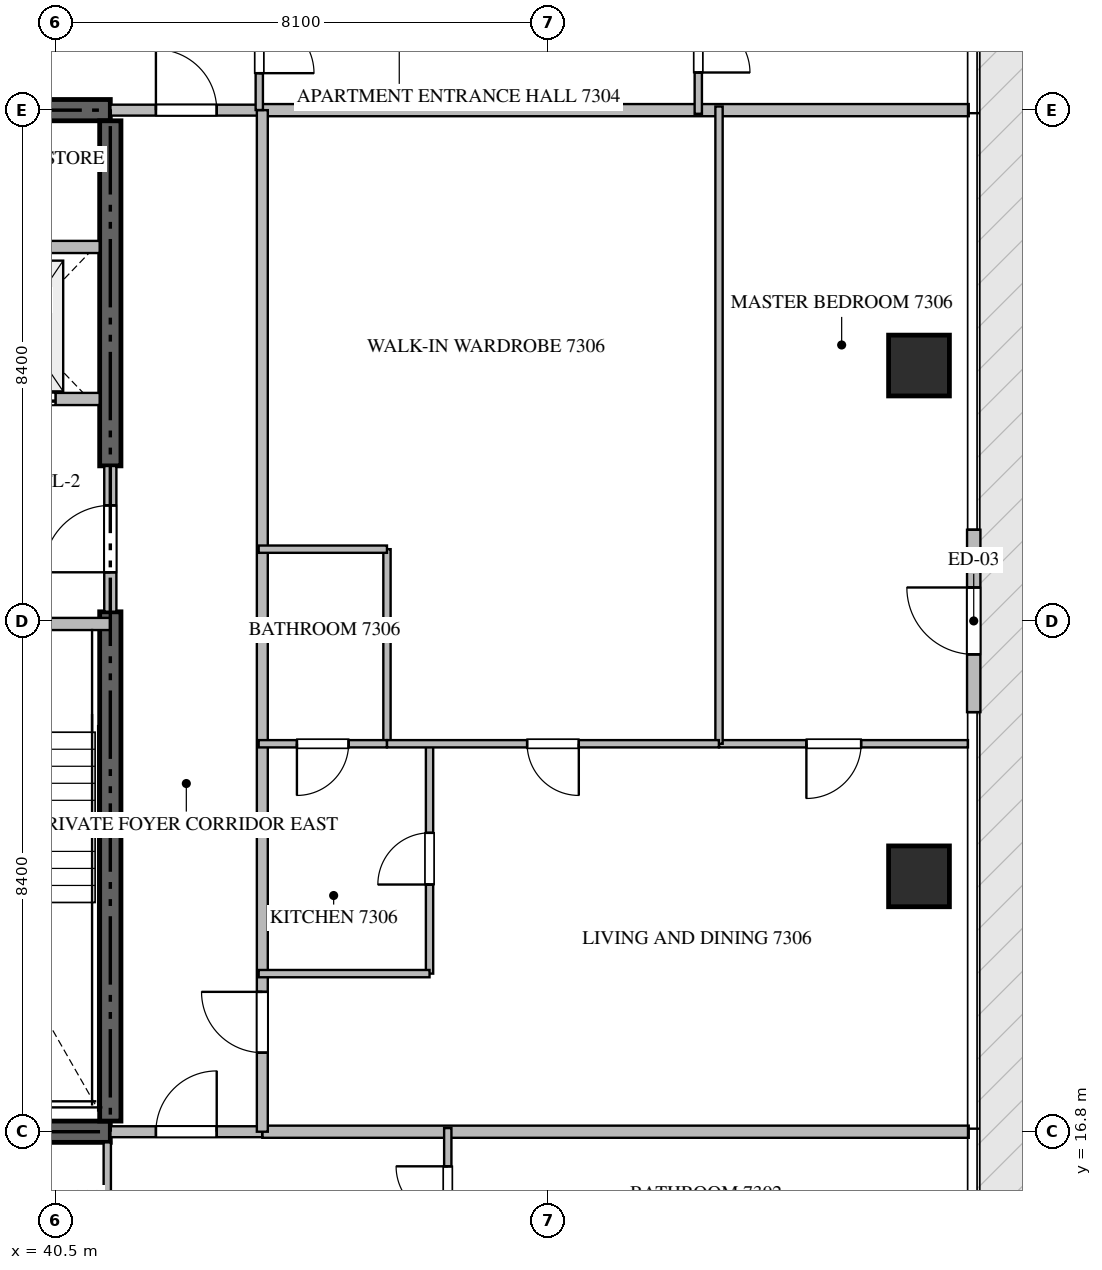
"""IFC4 building model, lengths in metres.
Left out: names, types, materials, properties, quantities, classifications, styles, units other than length and angle.
Written with IfcOpenShell. Run it as: python <this file> out.ifc"""

import sys

from ifc_helpers import new_model, si_unit, direction, frame, frame_2d, origin, origin_2d, place, context, subcontext, project, spatial, rectangle, extrude, source, transform, mapped, element, fill, save


model = new_model("IFC4")
c1 = context("Model", 3, precision=1e-05, world=origin(), true_north=direction((0.0, 1.0)))
c2 = subcontext(c1, "Body", "Model", "MODEL_VIEW")
j1 = project(units=[si_unit("LENGTHUNIT", "METRE"), si_unit("PLANEANGLEUNIT", "RADIAN")], contexts=[c1])
p1 = place(None, origin())
s1 = spatial("IfcSite", under=j1, at=p1, CompositionType="ELEMENT")
p2 = place(p1, origin())
s2 = spatial("IfcBuilding", under=s1, at=p2, CompositionType="ELEMENT")
p3 = place(p2, frame((0.0, 0.0, 293.45)))
s3 = spatial("IfcBuildingStorey", under=s2, at=p3, CompositionType="ELEMENT", Elevation=293.45)
for number, where, z_axis, x_axis in (
    (1, (23.4, 16.8, -0.26), (0.0, 0.0, 1.0), (1.0, 0.0, 0.0)),
    (2, (41.4, 33.6, -0.26), (0.0, 0.0, 1.0), (-1.0, 0.0, 0.0)),
):
    element("IfcWall", number, at=place(p3, frame(where, z_axis=z_axis, x_axis=x_axis)), inside=s3, PredefinedType="SHEAR", context=c2, shape_type="SweptSolid", body=[
        extrude(rectangle(XDim=18.0, YDim=0.35, at=frame_2d((9.0, 0.0))), origin(), (0.0, 0.0, 1.0), 4.048),
    ])
p4 = place(p3, frame((41.4, 16.975, -0.26), z_axis=(0.0, 0.0, 1.0), x_axis=(0.0, 1.0, 0.0)))
e3 = element("IfcWall", 3, at=p4, inside=s3, PredefinedType="SHEAR", context=c2, shape_type="SweptSolid", body=[
    extrude(rectangle(XDim=8.375, YDim=0.35, at=frame_2d((4.188, 0.0))), origin(), (0.0, 0.0, 1.0), 4.048),
])
p5 = place(p3, frame((41.4, 27.75, -0.26), z_axis=(0.0, 0.0, 1.0), x_axis=(0.0, 1.0, 0.0)))
e4 = element("IfcWall", 4, at=p5, inside=s3, PredefinedType="SHEAR", context=c2, shape_type="SweptSolid", body=[
    extrude(rectangle(XDim=5.675, YDim=0.35, at=frame_2d((2.837, 0.0))), origin(), (0.0, 0.0, 1.0), 4.048),
])
m1 = source(origin(), c2, "Body", "SweptSolid", [
    extrude(rectangle(XDim=1.0, YDim=1.0, at=origin_2d()), origin(), (0.0, 0.0, 1.0), 4.05),
])
for number, where, z_axis, x_axis in (
    (5, (54.7, 21.0, -0.26), (0.0, 0.0, 1.0), (1.0, 0.0, 0.0)),
    (6, (54.7, 29.4, -0.26), (0.0, 0.0, 1.0), (1.0, 0.0, 0.0)),
):
    element("IfcColumn", number, at=place(p3, frame(where, z_axis=z_axis, x_axis=x_axis)), inside=s3, PredefinedType="COLUMN", context=c2, shape_type="MappedRepresentation", body=[
        mapped(m1, transform((0.0, 0.0, 0.0), scale=1.0)),
    ])
p6 = place(p3, frame((55.6, 23.7, 0.0), z_axis=(0.0, 0.0, 1.0), x_axis=(0.0, 1.0, 0.0)))
e7 = element("IfcWall", 7, at=p6, inside=s3, PredefinedType="ELEMENTEDWALL", context=c2, shape_type="SweptSolid", body=[
    extrude(rectangle(XDim=3.0, YDim=0.22, at=frame_2d((1.5, 0.0))), origin(), (0.0, 0.0, 1.0), 3.775),
])
p7 = place(p6, frame((0.95, 0.0, 0.0)))
e8 = element("IfcOpeningElement", 8, at=p7, cuts=e7, PredefinedType="OPENING", context=c2, shape_type="SweptSolid", body=[
    extrude(rectangle(XDim=1.1, YDim=2.2, at=frame_2d((0.55, 1.1))), frame((0.0, 0.12, 0.0), z_axis=(0.0, -1.0, 0.0), x_axis=(1.0, 0.0, 0.0)), (0.0, 0.0, 1.0), 0.24),
])
p8 = place(p3, frame((36.95, 25.15, 0.0), z_axis=(0.0, 0.0, 1.0), x_axis=(1.0, 0.0, 0.0)))
e9 = element("IfcWall", 9, at=p8, inside=s3, PredefinedType="STANDARD", context=c2, shape_type="SweptSolid", body=[
    extrude(rectangle(XDim=4.45, YDim=0.2, at=frame_2d((2.225, 0.0))), origin(), (0.0, 0.0, 1.0), 3.79),
])
p9 = place(p8, frame((1.65, 0.0, 0.0)))
e10 = element("IfcOpeningElement", 10, at=p9, cuts=e9, PredefinedType="OPENING", context=c2, shape_type="SweptSolid", body=[
    extrude(rectangle(XDim=1.1, YDim=2.15, at=frame_2d((0.55, 1.075))), frame((0.0, 0.11, 0.0), z_axis=(0.0, -1.0, 0.0), x_axis=(1.0, 0.0, 0.0)), (0.0, 0.0, 1.0), 0.22),
])
p10 = place(p3, frame((38.75, 28.85, 0.0), z_axis=(0.0, 0.0, 1.0), x_axis=(1.0, 0.0, 0.0)))
e11 = element("IfcWall", 11, at=p10, inside=s3, PredefinedType="STANDARD", context=c2, shape_type="SweptSolid", body=[
    extrude(rectangle(XDim=2.475, YDim=0.2, at=frame_2d((1.238, 0.0))), origin(), (0.0, 0.0, 1.0), 3.79),
])
p11 = place(p10, frame((0.55, 0.0, 0.0)))
e12 = element("IfcOpeningElement", 12, at=p11, cuts=e11, PredefinedType="OPENING", context=c2, shape_type="SweptSolid", body=[
    extrude(rectangle(XDim=1.2, YDim=2.2, at=frame_2d((0.6, 1.1))), frame((0.0, 0.11, 0.0), z_axis=(0.0, -1.0, 0.0), x_axis=(1.0, 0.0, 0.0)), (0.0, 0.0, 1.0), 0.22),
])
p12 = place(p3, frame((38.75, 31.35, 0.0), z_axis=(0.0, 0.0, 1.0), x_axis=(1.0, 0.0, 0.0)))
e13 = element("IfcWall", 13, at=p12, inside=s3, PredefinedType="STANDARD", context=c2, shape_type="SweptSolid", body=[
    extrude(rectangle(XDim=2.475, YDim=0.2, at=frame_2d((1.238, 0.0))), origin(), (0.0, 0.0, 1.0), 3.79),
])
p13 = place(p3, frame((41.4, 25.352, 0.0), z_axis=(0.0, 0.0, 1.0), x_axis=(0.0, 1.0, 0.0)))
e14 = element("IfcWall", 14, at=p13, inside=s3, PredefinedType="STANDARD", context=c2, shape_type="SweptSolid", body=[
    extrude(rectangle(XDim=2.396, YDim=0.2, at=frame_2d((1.198, 0.0))), origin(), (0.0, 0.0, 1.0), 3.79),
])
p14 = place(p13, frame((0.648, 0.0, 0.0)))
e15 = element("IfcOpeningElement", 15, at=p14, cuts=e14, PredefinedType="OPENING", context=c2, shape_type="SweptSolid", body=[
    extrude(rectangle(XDim=1.1, YDim=2.15, at=frame_2d((0.55, 1.075))), frame((0.0, 0.11, 0.0), z_axis=(0.0, -1.0, 0.0), x_axis=(1.0, 0.0, 0.0)), (0.0, 0.0, 1.0), 0.22),
])
for number, where, z_axis, x_axis in (
    (16, (43.9, 16.8, 0.0), (0.0, 0.0, 1.0), (1.0, 0.0, 0.0)),
    (17, (43.9, 33.6, 0.0), (0.0, 0.0, 1.0), (1.0, 0.0, 0.0)),
):
    element("IfcWall", number, at=place(p3, frame(where, z_axis=z_axis, x_axis=x_axis)), inside=s3, PredefinedType="PARTITIONING", context=c2, shape_type="SweptSolid", body=[
        extrude(rectangle(XDim=11.618, YDim=0.2, at=frame_2d((5.809, 0.0))), origin(), (0.0, 0.0, 1.0), 3.79),
    ])
p15 = place(p3, frame((41.402, 16.8, 0.0), z_axis=(0.0, 0.0, 1.0), x_axis=(1.0, 0.0, 0.0)))
e18 = element("IfcWall", 18, at=p15, inside=s3, PredefinedType="PARTITIONING", context=c2, shape_type="SweptSolid", body=[
    extrude(rectangle(XDim=2.496, YDim=0.18, at=frame_2d((1.248, 0.0))), origin(), (0.0, 0.0, 1.0), 3.79),
])
p16 = place(p15, frame((0.748, 0.0, 0.0)))
e19 = element("IfcOpeningElement", 19, at=p16, cuts=e18, PredefinedType="OPENING", context=c2, shape_type="SweptSolid", body=[
    extrude(rectangle(XDim=1.0, YDim=2.15, at=frame_2d((0.5, 1.075))), frame((0.0, 0.1, 0.0), z_axis=(0.0, -1.0, 0.0), x_axis=(1.0, 0.0, 0.0)), (0.0, 0.0, 1.0), 0.2),
])
p17 = place(p3, frame((41.402, 33.6, 0.0), z_axis=(0.0, 0.0, 1.0), x_axis=(1.0, 0.0, 0.0)))
e20 = element("IfcWall", 20, at=p17, inside=s3, PredefinedType="PARTITIONING", context=c2, shape_type="SweptSolid", body=[
    extrude(rectangle(XDim=2.496, YDim=0.18, at=frame_2d((1.248, 0.0))), origin(), (0.0, 0.0, 1.0), 3.79),
])
p18 = place(p17, frame((0.748, 0.0, 0.0)))
e21 = element("IfcOpeningElement", 21, at=p18, cuts=e20, PredefinedType="OPENING", context=c2, shape_type="SweptSolid", body=[
    extrude(rectangle(XDim=1.0, YDim=2.15, at=frame_2d((0.5, 1.075))), frame((0.0, 0.1, 0.0), z_axis=(0.0, -1.0, 0.0), x_axis=(1.0, 0.0, 0.0)), (0.0, 0.0, 1.0), 0.2),
])
p19 = place(p3, frame((43.9, 16.8, 0.0), z_axis=(0.0, 0.0, 1.0), x_axis=(0.0, 1.0, 0.0)))
e22 = element("IfcWall", 22, at=p19, inside=s3, PredefinedType="PARTITIONING", context=c2, shape_type="SweptSolid", body=[
    extrude(rectangle(XDim=16.8, YDim=0.18, at=frame_2d((8.4, 0.0))), origin(), (0.0, 0.0, 1.0), 3.79),
])
p20 = place(p19, frame((1.3, 0.0, 0.0)))
e23 = element("IfcOpeningElement", 23, at=p20, cuts=e22, PredefinedType="OPENING", context=c2, shape_type="SweptSolid", body=[
    extrude(rectangle(XDim=1.0, YDim=2.15, at=frame_2d((0.5, 1.075))), frame((0.0, 0.1, 0.0), z_axis=(0.0, -1.0, 0.0), x_axis=(1.0, 0.0, 0.0)), (0.0, 0.0, 1.0), 0.2),
])
p21 = place(p3, frame((41.35, 14.05, 0.0), z_axis=(0.0, 0.0, 1.0), x_axis=(0.0, 1.0, 0.0)))
e24 = element("IfcWall", 24, at=p21, inside=s3, PredefinedType="PARTITIONING", context=c2, shape_type="SweptSolid", body=[
    extrude(rectangle(XDim=2.575, YDim=0.12, at=frame_2d((1.288, 0.0))), origin(), (0.0, 0.0, 1.0), 3.79),
])
p22 = place(p3, frame((46.95, 14.752, 0.0), z_axis=(0.0, 0.0, 1.0), x_axis=(0.0, 1.0, 0.0)))
e25 = element("IfcWall", 25, at=p22, inside=s3, PredefinedType="PARTITIONING", context=c2, shape_type="SweptSolid", body=[
    extrude(rectangle(XDim=2.108, YDim=0.12, at=frame_2d((1.054, 0.0))), origin(), (0.0, 0.0, 1.0), 3.372),
])
p23 = place(p22, frame((0.629, 0.0, 0.0)))
e26 = element("IfcOpeningElement", 26, at=p23, cuts=e25, PredefinedType="OPENING", context=c2, shape_type="SweptSolid", body=[
    extrude(rectangle(XDim=0.85, YDim=2.1, at=frame_2d((0.425, 1.05))), frame((0.0, 0.07, 0.0), z_axis=(0.0, -1.0, 0.0), x_axis=(1.0, 0.0, 0.0)), (0.0, 0.0, 1.0), 0.14),
])
p24 = place(p3, frame((43.85, 35.75, 0.0), z_axis=(0.0, 0.0, 1.0), x_axis=(0.0, -1.0, 0.0)))
e27 = element("IfcWall", 27, at=p24, inside=s3, PredefinedType="PARTITIONING", context=c2, shape_type="SweptSolid", body=[
    extrude(rectangle(XDim=2.148, YDim=0.12, at=frame_2d((1.074, 0.0))), origin(), (0.0, 0.0, 1.0), 3.79),
])
p25 = place(p24, frame((0.642, 0.0, 0.0)))
e28 = element("IfcOpeningElement", 28, at=p25, cuts=e27, PredefinedType="OPENING", context=c2, shape_type="SweptSolid", body=[
    extrude(rectangle(XDim=0.9, YDim=2.1, at=frame_2d((0.45, 1.05))), frame((0.0, 0.07, 0.0), z_axis=(0.0, -1.0, 0.0), x_axis=(1.0, 0.0, 0.0)), (0.0, 0.0, 1.0), 0.14),
])
p26 = place(p3, frame((51.07, 35.748, 0.0), z_axis=(0.0, 0.0, 1.0), x_axis=(0.0, -1.0, 0.0)))
e29 = element("IfcWall", 29, at=p26, inside=s3, PredefinedType="PARTITIONING", context=c2, shape_type="SweptSolid", body=[
    extrude(rectangle(XDim=2.208, YDim=0.12, at=frame_2d((1.104, 0.0))), origin(), (0.0, 0.0, 1.0), 3.79),
])
p27 = place(p26, frame((0.679, 0.0, 0.0)))
e30 = element("IfcOpeningElement", 30, at=p27, cuts=e29, PredefinedType="OPENING", context=c2, shape_type="SweptSolid", body=[
    extrude(rectangle(XDim=0.85, YDim=2.1, at=frame_2d((0.425, 1.05))), frame((0.0, 0.07, 0.0), z_axis=(0.0, -1.0, 0.0), x_axis=(1.0, 0.0, 0.0)), (0.0, 0.0, 1.0), 0.14),
])
p28 = place(p3, frame((46.65, 19.4, 0.0), z_axis=(0.0, 0.0, 1.0), x_axis=(0.0, 1.0, 0.0)))
e31 = element("IfcWall", 31, at=p28, inside=s3, PredefinedType="PARTITIONING", context=c2, shape_type="SweptSolid", body=[
    extrude(rectangle(XDim=3.78, YDim=0.12, at=frame_2d((1.89, 0.0))), origin(), (0.0, 0.0, 1.0), 3.79),
])
p29 = place(p28, frame((1.465, 0.0, 0.0)))
e32 = element("IfcOpeningElement", 32, at=p29, cuts=e31, PredefinedType="OPENING", context=c2, shape_type="SweptSolid", body=[
    extrude(rectangle(XDim=0.85, YDim=2.1, at=frame_2d((0.425, 1.05))), frame((0.0, 0.07, 0.0), z_axis=(0.0, -1.0, 0.0), x_axis=(1.0, 0.0, 0.0)), (0.0, 0.0, 1.0), 0.14),
])
p30 = place(p3, frame((46.65, 19.4, 0.0), z_axis=(0.0, 0.0, 1.0), x_axis=(-1.0, 0.0, 0.0)))
e33 = element("IfcWall", 33, at=p30, inside=s3, PredefinedType="PARTITIONING", context=c2, shape_type="SweptSolid", body=[
    extrude(rectangle(XDim=2.81, YDim=0.12, at=frame_2d((1.405, 0.0))), origin(), (0.0, 0.0, 1.0), 3.79),
])
p31 = place(p3, frame((55.505, 23.18, 0.0), z_axis=(0.0, 0.0, 1.0), x_axis=(-1.0, 0.0, 0.0)))
e34 = element("IfcWall", 34, at=p31, inside=s3, PredefinedType="PARTITIONING", context=c2, shape_type="SweptSolid", body=[
    extrude(rectangle(XDim=4.094, YDim=0.12, at=frame_2d((2.047, 0.0))), origin(), (0.0, 0.0, 1.0), 3.79),
])
p32 = place(p31, frame((1.757, 0.0, 0.0)))
e35 = element("IfcOpeningElement", 35, at=p32, cuts=e34, PredefinedType="OPENING", context=c2, shape_type="SweptSolid", body=[
    extrude(rectangle(XDim=0.9, YDim=2.1, at=frame_2d((0.45, 1.05))), frame((0.0, 0.07, 0.0), z_axis=(0.0, -1.0, 0.0), x_axis=(1.0, 0.0, 0.0)), (0.0, 0.0, 1.0), 0.14),
])
p33 = place(p3, frame((51.411, 23.18, 0.0), z_axis=(0.0, 0.0, 1.0), x_axis=(0.0, 1.0, 0.0)))
e36 = element("IfcWall", 36, at=p33, inside=s3, PredefinedType="PARTITIONING", context=c2, shape_type="SweptSolid", body=[
    extrude(rectangle(XDim=10.48, YDim=0.12, at=frame_2d((5.24, 0.0))), origin(), (0.0, 0.0, 1.0), 3.79),
])
p34 = place(p3, frame((45.95, 23.18, 0.0), z_axis=(0.0, 0.0, 1.0), x_axis=(0.0, 1.0, 0.0)))
e37 = element("IfcWall", 37, at=p34, inside=s3, PredefinedType="PARTITIONING", context=c2, shape_type="SweptSolid", body=[
    extrude(rectangle(XDim=3.2, YDim=0.12, at=frame_2d((1.6, 0.0))), origin(), (0.0, 0.0, 1.0), 3.79),
])
p35 = place(p3, frame((45.95, 26.38, 0.0), z_axis=(0.0, 0.0, 1.0), x_axis=(-1.0, 0.0, 0.0)))
e38 = element("IfcWall", 38, at=p35, inside=s3, PredefinedType="PARTITIONING", context=c2, shape_type="SweptSolid", body=[
    extrude(rectangle(XDim=2.11, YDim=0.12, at=frame_2d((1.055, 0.0))), origin(), (0.0, 0.0, 1.0), 3.79),
])
p36 = place(p3, frame((51.409, 23.18, 0.0), z_axis=(0.0, 0.0, 1.0), x_axis=(-1.0, 0.0, 0.0)))
e39 = element("IfcWall", 39, at=p36, inside=s3, PredefinedType="PARTITIONING", context=c2, shape_type="SweptSolid", body=[
    extrude(rectangle(XDim=5.459, YDim=0.12, at=frame_2d((2.729, 0.0))), origin(), (0.0, 0.0, 1.0), 3.79),
])
p37 = place(p36, frame((2.304, 0.0, 0.0)))
e40 = element("IfcOpeningElement", 40, at=p37, cuts=e39, PredefinedType="OPENING", context=c2, shape_type="SweptSolid", body=[
    extrude(rectangle(XDim=0.85, YDim=2.1, at=frame_2d((0.425, 1.05))), frame((0.0, 0.07, 0.0), z_axis=(0.0, -1.0, 0.0), x_axis=(1.0, 0.0, 0.0)), (0.0, 0.0, 1.0), 0.14),
])
p38 = place(p3, frame((45.948, 23.18, 0.0), z_axis=(0.0, 0.0, 1.0), x_axis=(-1.0, 0.0, 0.0)))
e41 = element("IfcWall", 41, at=p38, inside=s3, PredefinedType="PARTITIONING", context=c2, shape_type="SweptSolid", body=[
    extrude(rectangle(XDim=2.108, YDim=0.12, at=frame_2d((1.054, 0.0))), origin(), (0.0, 0.0, 1.0), 3.79),
])
p39 = place(p38, frame((0.629, 0.0, 0.0)))
e42 = element("IfcOpeningElement", 42, at=p39, cuts=e41, PredefinedType="OPENING", context=c2, shape_type="SweptSolid", body=[
    extrude(rectangle(XDim=0.85, YDim=2.1, at=frame_2d((0.425, 1.05))), frame((0.0, 0.07, 0.0), z_axis=(0.0, -1.0, 0.0), x_axis=(1.0, 0.0, 0.0)), (0.0, 0.0, 1.0), 0.14),
])
m2 = source(origin(), c2, "Body", "SweptSolid", [
    extrude(rectangle(XDim=1.1, YDim=2.2, at=frame_2d((0.55, 1.1))), frame((0.0, 0.025, 0.0), z_axis=(0.0, -1.0, 0.0), x_axis=(1.0, 0.0, 0.0)), (0.0, 0.0, 1.0), 0.05),
])
p40 = place(p7, origin())
e43 = element("IfcDoor", 43, at=p40, inside=s3, OperationType="SINGLE_SWING_RIGHT", PredefinedType="DOOR", context=c2, shape_type="MappedRepresentation", body=[
    mapped(m2, transform((0.0, 0.0, 0.0), scale=1.0)),
])
fill(e8, e43)
m3 = source(origin(), c2, "Body", "SweptSolid", [
    extrude(rectangle(XDim=1.2, YDim=2.2, at=frame_2d((0.6, 1.1))), frame((0.0, 0.025, 0.0), z_axis=(0.0, -1.0, 0.0), x_axis=(1.0, 0.0, 0.0)), (0.0, 0.0, 1.0), 0.05),
])
p41 = place(p11, origin())
e44 = element("IfcDoor", 44, at=p41, inside=s3, OperationType="DOUBLE_DOOR_SLIDING", PredefinedType="DOOR", context=c2, shape_type="MappedRepresentation", body=[
    mapped(m3, transform((0.0, 0.0, 0.0), scale=1.0)),
])
fill(e12, e44)
m4 = source(origin(), c2, "Body", "SweptSolid", [
    extrude(rectangle(XDim=1.1, YDim=2.15, at=frame_2d((0.55, 1.075))), frame((0.0, 0.025, 0.0), z_axis=(0.0, -1.0, 0.0), x_axis=(1.0, 0.0, 0.0)), (0.0, 0.0, 1.0), 0.05),
])
p42 = place(p14, origin())
e45 = element("IfcDoor", 45, at=p42, inside=s3, OperationType="SINGLE_SWING_LEFT", PredefinedType="DOOR", context=c2, shape_type="MappedRepresentation", body=[
    mapped(m4, transform((0.0, 0.0, 0.0), scale=1.0)),
])
fill(e15, e45)
m5 = source(origin(), c2, "Body", "SweptSolid", [
    extrude(rectangle(XDim=1.0, YDim=2.15, at=frame_2d((0.5, 1.075))), frame((0.0, 0.025, 0.0), z_axis=(0.0, -1.0, 0.0), x_axis=(1.0, 0.0, 0.0)), (0.0, 0.0, 1.0), 0.05),
])
p43 = place(p16, origin())
e46 = element("IfcDoor", 46, at=p43, inside=s3, OperationType="SINGLE_SWING_RIGHT", PredefinedType="DOOR", context=c2, shape_type="MappedRepresentation", body=[
    mapped(m5, transform((0.0, 0.0, 0.0), scale=1.0)),
])
fill(e19, e46)
p44 = place(p18, origin())
e47 = element("IfcDoor", 47, at=p44, inside=s3, OperationType="SINGLE_SWING_LEFT", PredefinedType="DOOR", context=c2, shape_type="MappedRepresentation", body=[
    mapped(m5, transform((0.0, 0.0, 0.0), scale=1.0)),
])
fill(e21, e47)
p45 = place(p20, origin())
e48 = element("IfcDoor", 48, at=p45, inside=s3, OperationType="SINGLE_SWING_RIGHT", PredefinedType="DOOR", context=c2, shape_type="MappedRepresentation", body=[
    mapped(m5, transform((0.0, 0.0, 0.0), scale=1.0)),
])
fill(e23, e48)
m6 = source(origin(), c2, "Body", "SweptSolid", [
    extrude(rectangle(XDim=0.85, YDim=2.1, at=frame_2d((0.425, 1.05))), frame((0.0, 0.025, 0.0), z_axis=(0.0, -1.0, 0.0), x_axis=(1.0, 0.0, 0.0)), (0.0, 0.0, 1.0), 0.05),
])
p46 = place(p23, origin())
e49 = element("IfcDoor", 49, at=p46, inside=s3, OperationType="SINGLE_SWING_RIGHT", PredefinedType="DOOR", context=c2, shape_type="MappedRepresentation", body=[
    mapped(m6, transform((0.0, 0.0, 0.0), scale=1.0)),
])
fill(e26, e49)
m7 = source(origin(), c2, "Body", "SweptSolid", [
    extrude(rectangle(XDim=0.9, YDim=2.1, at=frame_2d((0.45, 1.05))), frame((0.0, 0.025, 0.0), z_axis=(0.0, -1.0, 0.0), x_axis=(1.0, 0.0, 0.0)), (0.0, 0.0, 1.0), 0.05),
])
p47 = place(p25, origin())
e50 = element("IfcDoor", 50, at=p47, inside=s3, OperationType="SINGLE_SWING_RIGHT", PredefinedType="DOOR", context=c2, shape_type="MappedRepresentation", body=[
    mapped(m7, transform((0.0, 0.0, 0.0), scale=1.0)),
])
fill(e28, e50)
p48 = place(p27, origin())
e51 = element("IfcDoor", 51, at=p48, inside=s3, OperationType="SINGLE_SWING_RIGHT", PredefinedType="DOOR", context=c2, shape_type="MappedRepresentation", body=[
    mapped(m6, transform((0.0, 0.0, 0.0), scale=1.0)),
])
fill(e30, e51)
p49 = place(p29, origin())
e52 = element("IfcDoor", 52, at=p49, inside=s3, OperationType="SINGLE_SWING_LEFT", PredefinedType="DOOR", context=c2, shape_type="MappedRepresentation", body=[
    mapped(m6, transform((0.0, 0.0, 0.0), scale=1.0)),
])
fill(e32, e52)
p50 = place(p32, origin())
e53 = element("IfcDoor", 53, at=p50, inside=s3, OperationType="SINGLE_SWING_RIGHT", PredefinedType="DOOR", context=c2, shape_type="MappedRepresentation", body=[
    mapped(m7, transform((0.0, 0.0, 0.0), scale=1.0)),
])
fill(e35, e53)
p51 = place(p37, origin())
e54 = element("IfcDoor", 54, at=p51, inside=s3, OperationType="SINGLE_SWING_LEFT", PredefinedType="DOOR", context=c2, shape_type="MappedRepresentation", body=[
    mapped(m6, transform((0.0, 0.0, 0.0), scale=1.0)),
])
fill(e40, e54)
p52 = place(p39, origin())
e55 = element("IfcDoor", 55, at=p52, inside=s3, OperationType="SINGLE_SWING_RIGHT", PredefinedType="DOOR", context=c2, shape_type="MappedRepresentation", body=[
    mapped(m6, transform((0.0, 0.0, 0.0), scale=1.0)),
])
fill(e42, e55)
save(model, sys.argv[1])
